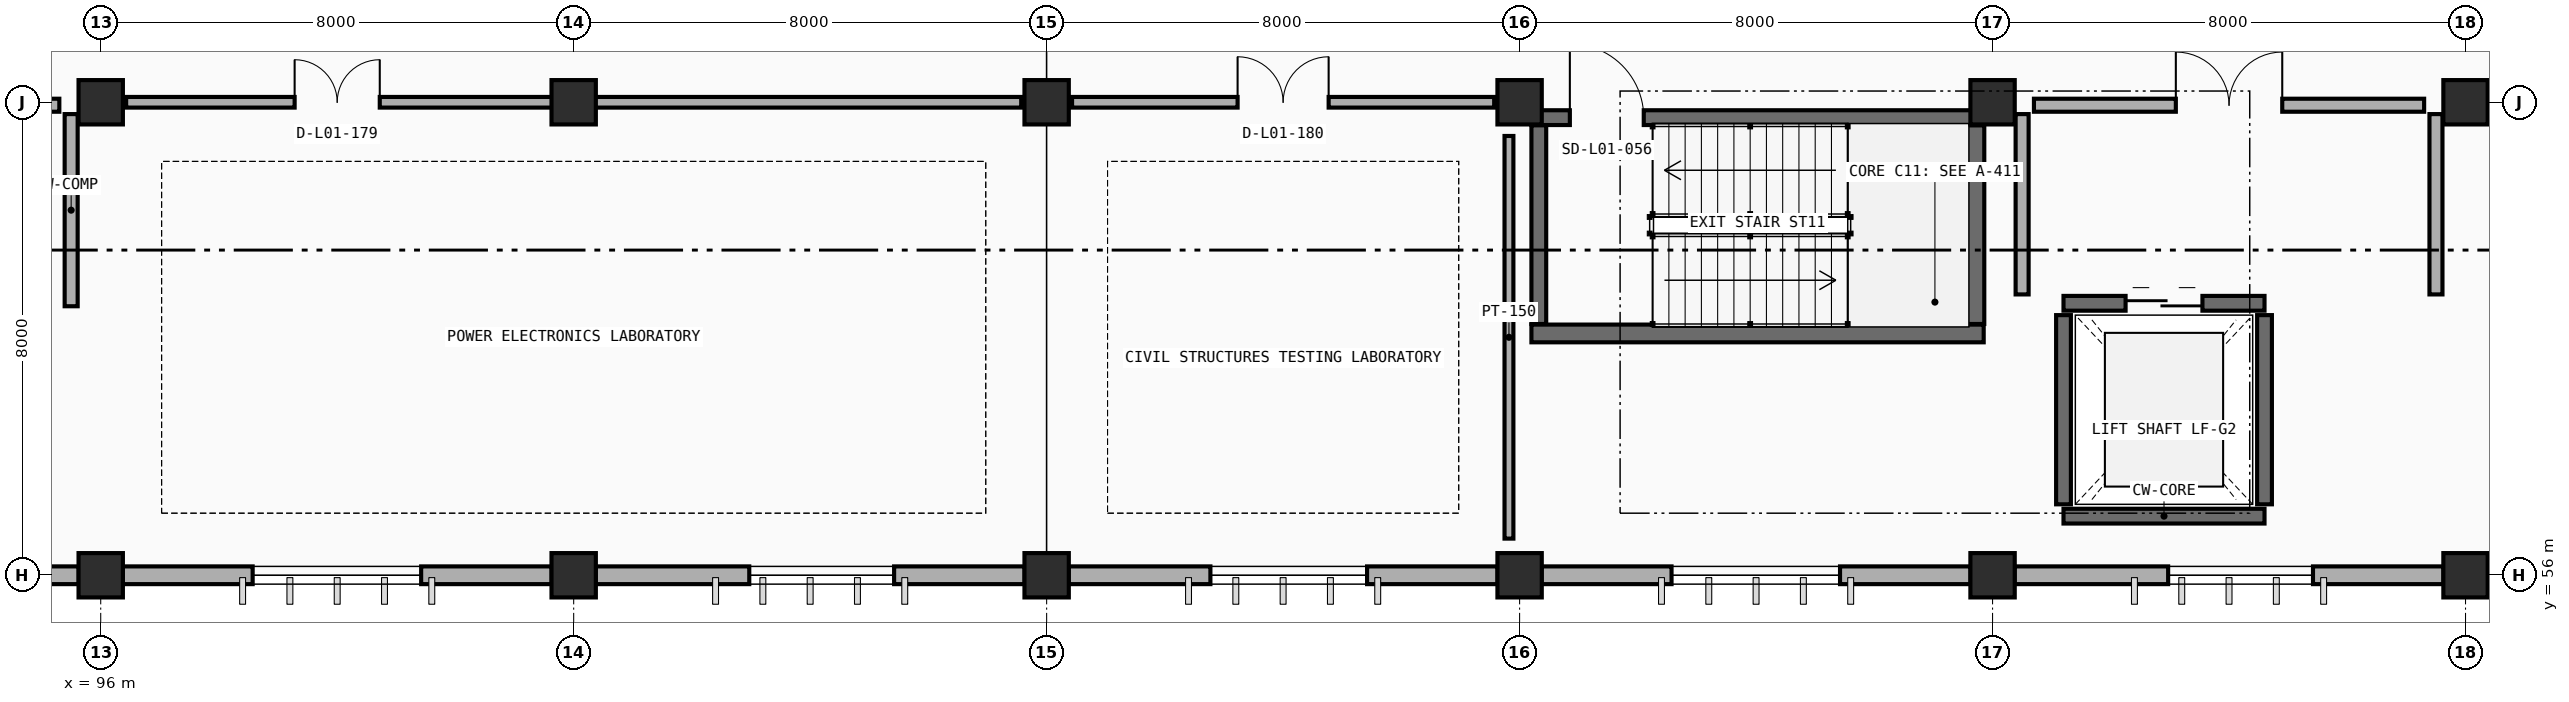
"""IFC4 building model, lengths in metres.
Left out: names, types, materials, properties, quantities, classifications, styles, units other than length and angle.
Written with IfcOpenShell. Run it as: python <this file> out.ifc"""

import sys

from ifc_helpers import new_model, si_unit, direction, frame, frame_2d, origin, origin_2d, place, context, subcontext, project, spatial, rectangle, extrude, element, fill, save


model = new_model("IFC4")
c1 = context("Model", 3, precision=1e-05, world=origin(), true_north=direction((0.0, 1.0)))
c2 = subcontext(c1, "Body", "Model", "MODEL_VIEW")
j1 = project(units=[si_unit("LENGTHUNIT", "METRE"), si_unit("PLANEANGLEUNIT", "RADIAN")], contexts=[c1])
p1 = place(None, origin())
s1 = spatial("IfcSite", under=j1, at=p1, CompositionType="ELEMENT")
p2 = place(p1, origin())
s2 = spatial("IfcBuilding", under=s1, at=p2, CompositionType="ELEMENT")
p3 = place(p2, origin())
s3 = spatial("IfcBuildingStorey", under=s2, at=p3, CompositionType="ELEMENT", Elevation=0.0)
for number, where, z_axis, x_axis in (
    (1, (96.0, 56.0, 0.0), (0.0, 0.0, 1.0), (1.0, 0.0, 0.0)),
    (2, (104.0, 56.0, 0.0), (0.0, 0.0, 1.0), (1.0, 0.0, 0.0)),
    (3, (112.0, 56.0, 0.0), (0.0, 0.0, 1.0), (1.0, 0.0, 0.0)),
    (4, (120.0, 56.0, 0.0), (0.0, 0.0, 1.0), (1.0, 0.0, 0.0)),
    (5, (128.0, 56.0, 0.0), (0.0, 0.0, 1.0), (1.0, 0.0, 0.0)),
    (6, (136.0, 56.0, 0.0), (0.0, 0.0, 1.0), (1.0, 0.0, 0.0)),
    (7, (96.0, 64.0, 0.0), (0.0, 0.0, 1.0), (1.0, 0.0, 0.0)),
    (8, (104.0, 64.0, 0.0), (0.0, 0.0, 1.0), (1.0, 0.0, 0.0)),
    (9, (112.0, 64.0, 0.0), (0.0, 0.0, 1.0), (1.0, 0.0, 0.0)),
    (10, (120.0, 64.0, 0.0), (0.0, 0.0, 1.0), (1.0, 0.0, 0.0)),
    (11, (128.0, 64.0, 0.0), (0.0, 0.0, 1.0), (1.0, 0.0, 0.0)),
    (12, (136.0, 64.0, 0.0), (0.0, 0.0, 1.0), (1.0, 0.0, 0.0)),
):
    element("IfcColumn", number, at=place(p3, frame(where, z_axis=z_axis, x_axis=x_axis)), inside=s3, PredefinedType="COLUMN", context=c2, shape_type="SweptSolid", body=[
        extrude(rectangle(XDim=0.75, YDim=0.75, at=origin_2d()), origin(), (0.0, 0.0, 1.0), 4.8),
    ])
p4 = place(p3, frame((95.628, 56.0, 0.0), z_axis=(0.0, 0.0, 1.0), x_axis=(-1.0, 0.0, 0.0)))
e13 = element("IfcWall", 13, at=p4, inside=s3, PredefinedType="STANDARD", context=c2, shape_type="SweptSolid", body=[
    extrude(rectangle(XDim=7.256, YDim=0.3, at=frame_2d((3.628, 0.0))), origin(), (0.0, 0.0, 1.0), 3.91),
])
p5 = place(p4, frame((2.208, 0.0, 0.9)))
e14 = element("IfcOpeningElement", 14, at=p5, cuts=e13, PredefinedType="OPENING", context=c2, shape_type="SweptSolid", body=[
    extrude(rectangle(XDim=2.65, YDim=1.85, at=frame_2d((1.325, 0.925))), frame((0.0, 0.16, 0.0), z_axis=(0.0, -1.0, 0.0), x_axis=(1.0, 0.0, 0.0)), (0.0, 0.0, 1.0), 0.32),
])
p6 = place(p3, frame((103.628, 56.0, 0.0), z_axis=(0.0, 0.0, 1.0), x_axis=(-1.0, 0.0, 0.0)))
e15 = element("IfcWall", 15, at=p6, inside=s3, PredefinedType="STANDARD", context=c2, shape_type="SweptSolid", body=[
    extrude(rectangle(XDim=7.256, YDim=0.3, at=frame_2d((3.628, 0.0))), origin(), (0.0, 0.0, 1.0), 3.91),
])
p7 = place(p6, frame((2.208, 0.0, 0.9)))
e16 = element("IfcOpeningElement", 16, at=p7, cuts=e15, PredefinedType="OPENING", context=c2, shape_type="SweptSolid", body=[
    extrude(rectangle(XDim=2.85, YDim=1.85, at=frame_2d((1.425, 0.925))), frame((0.0, 0.16, 0.0), z_axis=(0.0, -1.0, 0.0), x_axis=(1.0, 0.0, 0.0)), (0.0, 0.0, 1.0), 0.32),
])
p8 = place(p3, frame((111.628, 56.0, 0.0), z_axis=(0.0, 0.0, 1.0), x_axis=(-1.0, 0.0, 0.0)))
e17 = element("IfcWall", 17, at=p8, inside=s3, PredefinedType="STANDARD", context=c2, shape_type="SweptSolid", body=[
    extrude(rectangle(XDim=7.256, YDim=0.3, at=frame_2d((3.628, 0.0))), origin(), (0.0, 0.0, 1.0), 3.91),
])
p9 = place(p8, frame((2.208, 0.0, 0.9)))
e18 = element("IfcOpeningElement", 18, at=p9, cuts=e17, PredefinedType="OPENING", context=c2, shape_type="SweptSolid", body=[
    extrude(rectangle(XDim=2.45, YDim=1.85, at=frame_2d((1.225, 0.925))), frame((0.0, 0.16, 0.0), z_axis=(0.0, -1.0, 0.0), x_axis=(1.0, 0.0, 0.0)), (0.0, 0.0, 1.0), 0.32),
])
p10 = place(p3, frame((119.628, 56.0, 0.0), z_axis=(0.0, 0.0, 1.0), x_axis=(-1.0, 0.0, 0.0)))
e19 = element("IfcWall", 19, at=p10, inside=s3, PredefinedType="STANDARD", context=c2, shape_type="SweptSolid", body=[
    extrude(rectangle(XDim=7.256, YDim=0.3, at=frame_2d((3.628, 0.0))), origin(), (0.0, 0.0, 1.0), 3.91),
])
p11 = place(p10, frame((2.208, 0.0, 0.9)))
e20 = element("IfcOpeningElement", 20, at=p11, cuts=e19, PredefinedType="OPENING", context=c2, shape_type="SweptSolid", body=[
    extrude(rectangle(XDim=2.65, YDim=1.85, at=frame_2d((1.325, 0.925))), frame((0.0, 0.16, 0.0), z_axis=(0.0, -1.0, 0.0), x_axis=(1.0, 0.0, 0.0)), (0.0, 0.0, 1.0), 0.32),
])
p12 = place(p3, frame((127.628, 56.0, 0.0), z_axis=(0.0, 0.0, 1.0), x_axis=(-1.0, 0.0, 0.0)))
e21 = element("IfcWall", 21, at=p12, inside=s3, PredefinedType="STANDARD", context=c2, shape_type="SweptSolid", body=[
    extrude(rectangle(XDim=7.256, YDim=0.3, at=frame_2d((3.628, 0.0))), origin(), (0.0, 0.0, 1.0), 3.91),
])
p13 = place(p12, frame((2.208, 0.0, 0.9)))
e22 = element("IfcOpeningElement", 22, at=p13, cuts=e21, PredefinedType="OPENING", context=c2, shape_type="SweptSolid", body=[
    extrude(rectangle(XDim=2.85, YDim=1.85, at=frame_2d((1.425, 0.925))), frame((0.0, 0.16, 0.0), z_axis=(0.0, -1.0, 0.0), x_axis=(1.0, 0.0, 0.0)), (0.0, 0.0, 1.0), 0.32),
])
p14 = place(p3, frame((135.628, 56.0, 0.0), z_axis=(0.0, 0.0, 1.0), x_axis=(-1.0, 0.0, 0.0)))
e23 = element("IfcWall", 23, at=p14, inside=s3, PredefinedType="STANDARD", context=c2, shape_type="SweptSolid", body=[
    extrude(rectangle(XDim=7.256, YDim=0.3, at=frame_2d((3.628, 0.0))), origin(), (0.0, 0.0, 1.0), 3.91),
])
p15 = place(p14, frame((2.208, 0.0, 0.9)))
e24 = element("IfcOpeningElement", 24, at=p15, cuts=e23, PredefinedType="OPENING", context=c2, shape_type="SweptSolid", body=[
    extrude(rectangle(XDim=2.45, YDim=1.85, at=frame_2d((1.225, 0.925))), frame((0.0, 0.16, 0.0), z_axis=(0.0, -1.0, 0.0), x_axis=(1.0, 0.0, 0.0)), (0.0, 0.0, 1.0), 0.32),
])
p16 = place(p3, frame((143.628, 56.0, 0.0), z_axis=(0.0, 0.0, 1.0), x_axis=(-1.0, 0.0, 0.0)))
e25 = element("IfcWall", 25, at=p16, inside=s3, PredefinedType="STANDARD", context=c2, shape_type="SweptSolid", body=[
    extrude(rectangle(XDim=7.256, YDim=0.3, at=frame_2d((3.628, 0.0))), origin(), (0.0, 0.0, 1.0), 3.91),
])
p17 = place(p16, frame((2.208, 0.0, 0.9)))
e26 = element("IfcOpeningElement", 26, at=p17, cuts=e25, PredefinedType="OPENING", context=c2, shape_type="SweptSolid", body=[
    extrude(rectangle(XDim=2.65, YDim=1.85, at=frame_2d((1.325, 0.925))), frame((0.0, 0.16, 0.0), z_axis=(0.0, -1.0, 0.0), x_axis=(1.0, 0.0, 0.0)), (0.0, 0.0, 1.0), 0.32),
])
p18 = place(p3, frame((120.2, 60.09, 0.0), z_axis=(0.0, 0.0, 1.0), x_axis=(1.0, 0.0, 0.0)))
e27 = element("IfcWall", 27, at=p18, inside=s3, PredefinedType="SHEAR", context=c2, shape_type="SweptSolid", body=[
    extrude(rectangle(XDim=7.65, YDim=0.3, at=frame_2d((3.825, 0.0))), origin(), (0.0, 0.0, 1.0), 4.8),
])
p19 = place(p3, frame((127.71, 60.25, 0.0), z_axis=(0.0, 0.0, 1.0), x_axis=(0.0, 1.0, 0.0)))
e28 = element("IfcWall", 28, at=p19, inside=s3, PredefinedType="SHEAR", context=c2, shape_type="SweptSolid", body=[
    extrude(rectangle(XDim=3.36, YDim=0.3, at=frame_2d((1.68, 0.0))), origin(), (0.0, 0.0, 1.0), 4.8),
])
p20 = place(p3, frame((120.2, 63.74, 0.0), z_axis=(0.0, 0.0, 1.0), x_axis=(1.0, 0.0, 0.0)))
e29 = element("IfcWall", 29, at=p20, inside=s3, PredefinedType="SOLIDWALL", context=c2, shape_type="SweptSolid", body=[
    extrude(rectangle(XDim=7.65, YDim=0.25, at=frame_2d((3.825, 0.0))), origin(), (0.0, 0.0, 1.0), 4.8),
])
p21 = place(p20, frame((0.65, 0.0, 0.0)))
e30 = element("IfcOpeningElement", 30, at=p21, cuts=e29, PredefinedType="OPENING", context=c2, shape_type="SweptSolid", body=[
    extrude(rectangle(XDim=1.25, YDim=2.15, at=frame_2d((0.625, 1.075))), frame((0.0, 0.135, 0.0), z_axis=(0.0, -1.0, 0.0), x_axis=(1.0, 0.0, 0.0)), (0.0, 0.0, 1.0), 0.27),
])
p22 = place(p3, frame((120.325, 60.25, 0.0), z_axis=(0.0, 0.0, 1.0), x_axis=(0.0, 1.0, 0.0)))
e31 = element("IfcWall", 31, at=p22, inside=s3, PredefinedType="SOLIDWALL", context=c2, shape_type="SweptSolid", body=[
    extrude(rectangle(XDim=3.36, YDim=0.25, at=frame_2d((1.68, 0.0))), origin(), (0.0, 0.0, 1.0), 4.8),
])
p23 = place(p3, frame((88.7, 63.95, 0.0), z_axis=(0.0, 0.0, 1.0), x_axis=(1.0, 0.0, 0.0)))
e32 = element("IfcWall", 32, at=p23, inside=s3, PredefinedType="PARTITIONING", context=c2, shape_type="SweptSolid", body=[
    extrude(rectangle(XDim=6.6, YDim=0.22, at=frame_2d((3.3, 0.0))), origin(), (0.0, 0.0, 1.0), 3.81),
])
p24 = place(p23, frame((2.4, 0.0, 0.0)))
e33 = element("IfcOpeningElement", 33, at=p24, cuts=e32, PredefinedType="OPENING", context=c2, shape_type="SweptSolid", body=[
    extrude(rectangle(XDim=1.8, YDim=2.2, at=frame_2d((0.9, 1.1))), frame((0.0, 0.12, 0.0), z_axis=(0.0, -1.0, 0.0), x_axis=(1.0, 0.0, 0.0)), (0.0, 0.0, 1.0), 0.24),
])
p25 = place(p3, frame((95.5, 60.55, 0.0), z_axis=(0.0, 0.0, 1.0), x_axis=(0.0, 1.0, 0.0)))
e34 = element("IfcWall", 34, at=p25, inside=s3, PredefinedType="PARTITIONING", context=c2, shape_type="SweptSolid", body=[
    extrude(rectangle(XDim=3.25, YDim=0.22, at=frame_2d((1.625, 0.0))), origin(), (0.0, 0.0, 1.0), 3.76),
])
p26 = place(p3, frame((129.2, 57.0, 0.0), z_axis=(0.0, 0.0, 1.0), x_axis=(1.0, 0.0, 0.0)))
e35 = element("IfcWall", 35, at=p26, inside=s3, PredefinedType="SOLIDWALL", context=c2, shape_type="SweptSolid", body=[
    extrude(rectangle(XDim=3.4, YDim=0.25, at=frame_2d((1.7, 0.0))), origin(), (0.0, 0.0, 1.0), 4.8),
])
p27 = place(p3, frame((129.2, 60.6, 0.0), z_axis=(0.0, 0.0, 1.0), x_axis=(1.0, 0.0, 0.0)))
e36 = element("IfcWall", 36, at=p27, inside=s3, PredefinedType="SOLIDWALL", context=c2, shape_type="SweptSolid", body=[
    extrude(rectangle(XDim=3.4, YDim=0.25, at=frame_2d((1.7, 0.0))), origin(), (0.0, 0.0, 1.0), 4.8),
])
p28 = place(p27, frame((1.05, 0.0, 0.0)))
e37 = element("IfcOpeningElement", 37, at=p28, cuts=e36, PredefinedType="OPENING", context=c2, shape_type="SweptSolid", body=[
    extrude(rectangle(XDim=1.3, YDim=2.2, at=frame_2d((0.65, 1.1))), frame((0.0, 0.135, 0.0), z_axis=(0.0, -1.0, 0.0), x_axis=(1.0, 0.0, 0.0)), (0.0, 0.0, 1.0), 0.27),
])
for number, where, z_axis, x_axis in (
    (38, (129.2, 57.2, 0.0), (0.0, 0.0, 1.0), (0.0, 1.0, 0.0)),
    (39, (132.6, 57.2, 0.0), (0.0, 0.0, 1.0), (0.0, 1.0, 0.0)),
):
    element("IfcWall", number, at=place(p3, frame(where, z_axis=z_axis, x_axis=x_axis)), inside=s3, PredefinedType="SOLIDWALL", context=c2, shape_type="SweptSolid", body=[
        extrude(rectangle(XDim=3.2, YDim=0.25, at=frame_2d((1.6, 0.0))), origin(), (0.0, 0.0, 1.0), 4.8),
    ])
p29 = place(p3, frame((128.7, 63.95, 0.0), z_axis=(0.0, 0.0, 1.0), x_axis=(1.0, 0.0, 0.0)))
e40 = element("IfcWall", 40, at=p29, inside=s3, PredefinedType="PARTITIONING", context=c2, shape_type="SweptSolid", body=[
    extrude(rectangle(XDim=6.6, YDim=0.22, at=frame_2d((3.3, 0.0))), origin(), (0.0, 0.0, 1.0), 3.81),
])
p30 = place(p29, frame((2.4, 0.0, 0.0)))
e41 = element("IfcOpeningElement", 41, at=p30, cuts=e40, PredefinedType="OPENING", context=c2, shape_type="SweptSolid", body=[
    extrude(rectangle(XDim=1.8, YDim=2.2, at=frame_2d((0.9, 1.1))), frame((0.0, 0.12, 0.0), z_axis=(0.0, -1.0, 0.0), x_axis=(1.0, 0.0, 0.0)), (0.0, 0.0, 1.0), 0.24),
])
for number, where, z_axis, x_axis in (
    (42, (128.5, 60.75, 0.0), (0.0, 0.0, 1.0), (0.0, 1.0, 0.0)),
    (43, (135.5, 60.75, 0.0), (0.0, 0.0, 1.0), (0.0, 1.0, 0.0)),
):
    element("IfcWall", number, at=place(p3, frame(where, z_axis=z_axis, x_axis=x_axis)), inside=s3, PredefinedType="PARTITIONING", context=c2, shape_type="SweptSolid", body=[
        extrude(rectangle(XDim=3.05, YDim=0.22, at=frame_2d((1.525, 0.0))), origin(), (0.0, 0.0, 1.0), 3.76),
    ])
p31 = place(p3, frame((96.43, 64.0, 0.0), z_axis=(0.0, 0.0, 1.0), x_axis=(1.0, 0.0, 0.0)))
e44 = element("IfcWall", 44, at=p31, inside=s3, PredefinedType="PARTITIONING", context=c2, shape_type="SweptSolid", body=[
    extrude(rectangle(XDim=15.14, YDim=0.18, at=frame_2d((7.57, 0.0))), origin(), (0.0, 0.0, 1.0), 3.81),
])
p32 = place(p31, frame((2.85, 0.0, 0.0)))
e45 = element("IfcOpeningElement", 45, at=p32, cuts=e44, PredefinedType="OPENING", context=c2, shape_type="SweptSolid", body=[
    extrude(rectangle(XDim=1.44, YDim=2.2, at=frame_2d((0.72, 1.1))), frame((0.0, 0.1, 0.0), z_axis=(0.0, -1.0, 0.0), x_axis=(1.0, 0.0, 0.0)), (0.0, 0.0, 1.0), 0.2),
])
p33 = place(p3, frame((112.43, 64.0, 0.0), z_axis=(0.0, 0.0, 1.0), x_axis=(1.0, 0.0, 0.0)))
e46 = element("IfcWall", 46, at=p33, inside=s3, PredefinedType="PARTITIONING", context=c2, shape_type="SweptSolid", body=[
    extrude(rectangle(XDim=7.14, YDim=0.18, at=frame_2d((3.57, 0.0))), origin(), (0.0, 0.0, 1.0), 3.81),
])
p34 = place(p33, frame((2.8, 0.0, 0.0)))
e47 = element("IfcOpeningElement", 47, at=p34, cuts=e46, PredefinedType="OPENING", context=c2, shape_type="SweptSolid", body=[
    extrude(rectangle(XDim=1.54, YDim=2.2, at=frame_2d((0.77, 1.1))), frame((0.0, 0.1, 0.0), z_axis=(0.0, -1.0, 0.0), x_axis=(1.0, 0.0, 0.0)), (0.0, 0.0, 1.0), 0.2),
])
p35 = place(p3, frame((119.82, 56.62, 0.0), z_axis=(0.0, 0.0, 1.0), x_axis=(0.0, 1.0, 0.0)))
e48 = element("IfcWall", 48, at=p35, inside=s3, PredefinedType="PARTITIONING", context=c2, shape_type="SweptSolid", body=[
    extrude(rectangle(XDim=6.81, YDim=0.15, at=frame_2d((3.405, 0.0))), origin(), (0.0, 0.0, 1.0), 3.76),
])
p36 = place(p7, origin())
e49 = element("IfcWindow", 49, at=p36, inside=s3, PartitioningType="DOUBLE_PANEL_VERTICAL", PredefinedType="WINDOW", context=c2, shape_type="SweptSolid", body=[
    extrude(rectangle(XDim=2.85, YDim=1.85, at=frame_2d((1.425, 0.925))), frame((0.0, 0.03, 0.0), z_axis=(0.0, -1.0, 0.0), x_axis=(1.0, 0.0, 0.0)), (0.0, 0.0, 1.0), 0.06),
])
fill(e16, e49)
p37 = place(p9, origin())
e50 = element("IfcWindow", 50, at=p37, inside=s3, PartitioningType="DOUBLE_PANEL_VERTICAL", PredefinedType="WINDOW", context=c2, shape_type="SweptSolid", body=[
    extrude(rectangle(XDim=2.45, YDim=1.85, at=frame_2d((1.225, 0.925))), frame((0.0, 0.03, 0.0), z_axis=(0.0, -1.0, 0.0), x_axis=(1.0, 0.0, 0.0)), (0.0, 0.0, 1.0), 0.06),
])
fill(e18, e50)
p38 = place(p11, origin())
e51 = element("IfcWindow", 51, at=p38, inside=s3, PartitioningType="DOUBLE_PANEL_VERTICAL", PredefinedType="WINDOW", context=c2, shape_type="SweptSolid", body=[
    extrude(rectangle(XDim=2.65, YDim=1.85, at=frame_2d((1.325, 0.925))), frame((0.0, 0.03, 0.0), z_axis=(0.0, -1.0, 0.0), x_axis=(1.0, 0.0, 0.0)), (0.0, 0.0, 1.0), 0.06),
])
fill(e20, e51)
p39 = place(p13, origin())
e52 = element("IfcWindow", 52, at=p39, inside=s3, PartitioningType="DOUBLE_PANEL_VERTICAL", PredefinedType="WINDOW", context=c2, shape_type="SweptSolid", body=[
    extrude(rectangle(XDim=2.85, YDim=1.85, at=frame_2d((1.425, 0.925))), frame((0.0, 0.03, 0.0), z_axis=(0.0, -1.0, 0.0), x_axis=(1.0, 0.0, 0.0)), (0.0, 0.0, 1.0), 0.06),
])
fill(e22, e52)
p40 = place(p15, origin())
e53 = element("IfcWindow", 53, at=p40, inside=s3, PartitioningType="DOUBLE_PANEL_VERTICAL", PredefinedType="WINDOW", context=c2, shape_type="SweptSolid", body=[
    extrude(rectangle(XDim=2.45, YDim=1.85, at=frame_2d((1.225, 0.925))), frame((0.0, 0.03, 0.0), z_axis=(0.0, -1.0, 0.0), x_axis=(1.0, 0.0, 0.0)), (0.0, 0.0, 1.0), 0.06),
])
fill(e24, e53)
p41 = place(p21, origin())
e54 = element("IfcDoor", 54, at=p41, inside=s3, OperationType="SINGLE_SWING_LEFT", PredefinedType="DOOR", context=c2, shape_type="SweptSolid", body=[
    extrude(rectangle(XDim=1.25, YDim=2.15, at=frame_2d((0.625, 1.075))), frame((0.0, 0.025, 0.0), z_axis=(0.0, -1.0, 0.0), x_axis=(1.0, 0.0, 0.0)), (0.0, 0.0, 1.0), 0.05),
])
fill(e30, e54)
p42 = place(p28, origin())
e55 = element("IfcDoor", 55, at=p42, inside=s3, OperationType="DOUBLE_DOOR_SLIDING", PredefinedType="DOOR", context=c2, shape_type="SweptSolid", body=[
    extrude(rectangle(XDim=1.3, YDim=2.2, at=frame_2d((0.65, 1.1))), frame((0.0, 0.025, 0.0), z_axis=(0.0, -1.0, 0.0), x_axis=(1.0, 0.0, 0.0)), (0.0, 0.0, 1.0), 0.05),
])
fill(e37, e55)
p43 = place(p30, origin())
e56 = element("IfcDoor", 56, at=p43, inside=s3, OperationType="DOUBLE_DOOR_SINGLE_SWING", PredefinedType="DOOR", context=c2, shape_type="SweptSolid", body=[
    extrude(rectangle(XDim=1.8, YDim=2.2, at=frame_2d((0.9, 1.1))), frame((0.0, 0.025, 0.0), z_axis=(0.0, -1.0, 0.0), x_axis=(1.0, 0.0, 0.0)), (0.0, 0.0, 1.0), 0.05),
])
fill(e41, e56)
p44 = place(p32, origin())
e57 = element("IfcDoor", 57, at=p44, inside=s3, OperationType="DOUBLE_DOOR_SINGLE_SWING", PredefinedType="DOOR", context=c2, shape_type="SweptSolid", body=[
    extrude(rectangle(XDim=1.44, YDim=2.2, at=frame_2d((0.72, 1.1))), frame((0.0, 0.025, 0.0), z_axis=(0.0, -1.0, 0.0), x_axis=(1.0, 0.0, 0.0)), (0.0, 0.0, 1.0), 0.05),
])
fill(e45, e57)
p45 = place(p34, origin())
e58 = element("IfcDoor", 58, at=p45, inside=s3, OperationType="DOUBLE_DOOR_SINGLE_SWING", PredefinedType="DOOR", context=c2, shape_type="SweptSolid", body=[
    extrude(rectangle(XDim=1.54, YDim=2.2, at=frame_2d((0.77, 1.1))), frame((0.0, 0.025, 0.0), z_axis=(0.0, -1.0, 0.0), x_axis=(1.0, 0.0, 0.0)), (0.0, 0.0, 1.0), 0.05),
])
fill(e47, e58)
save(model, sys.argv[1])
